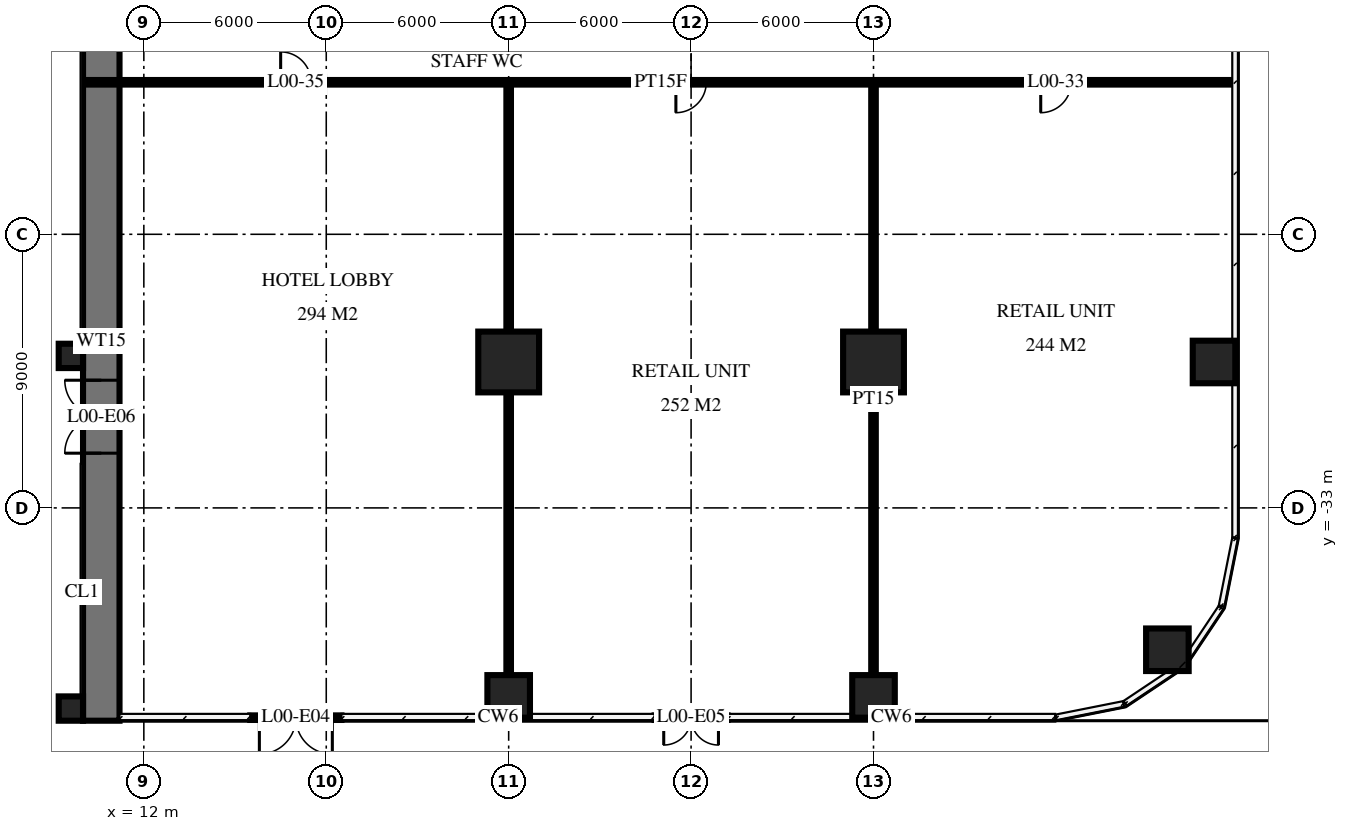
"""IFC4 building model, lengths in metres.
Left out: names, types, materials, properties, quantities, classifications, styles, units other than length and angle.
Written with IfcOpenShell. Run it as: python <this file> out.ifc"""

import sys

from ifc_helpers import new_model, si_unit, direction, frame, frame_2d, origin, origin_2d, place, context, subcontext, project, spatial, rectangle, circle, extrude, element, fill, save


model = new_model("IFC4")
c1 = context("Model", 3, precision=1e-05, world=origin(), true_north=direction((0.0, 1.0)))
c2 = subcontext(c1, "Body", "Model", "MODEL_VIEW")
j1 = project(units=[si_unit("LENGTHUNIT", "METRE"), si_unit("PLANEANGLEUNIT", "RADIAN")], contexts=[c1])
p1 = place(None, origin())
s1 = spatial("IfcSite", under=j1, at=p1, CompositionType="ELEMENT")
p2 = place(p1, origin())
s2 = spatial("IfcBuilding", under=s1, at=p2, CompositionType="ELEMENT")
p3 = place(p2, origin())
s3 = spatial("IfcBuildingStorey", under=s2, at=p3, CompositionType="ELEMENT", Elevation=0.0)
p4 = place(p3, frame((24.0, -39.2, -0.3), z_axis=(0.0, 0.0, 1.0), x_axis=(1.0, 0.0, 0.0)))
e1 = element("IfcColumn", 1, at=p4, inside=s3, PredefinedType="COLUMN", context=c2, shape_type="SweptSolid", body=[
    extrude(circle(Radius=0.7, at=origin_2d()), origin(), (0.0, 0.0, 1.0), 7.3),
])
p5 = place(p3, frame((24.0, -28.2, -0.3), z_axis=(0.0, 0.0, 1.0), x_axis=(1.0, 0.0, 0.0)))
e2 = element("IfcColumn", 2, at=p5, inside=s3, PredefinedType="COLUMN", context=c2, shape_type="SweptSolid", body=[
    extrude(circle(Radius=1.0, at=origin_2d()), origin(), (0.0, 0.0, 1.0), 7.3),
])
p6 = place(p3, frame((36.0, -39.2, -0.3), z_axis=(0.0, 0.0, 1.0), x_axis=(1.0, 0.0, 0.0)))
e3 = element("IfcColumn", 3, at=p6, inside=s3, PredefinedType="COLUMN", context=c2, shape_type="SweptSolid", body=[
    extrude(circle(Radius=0.7, at=origin_2d()), origin(), (0.0, 0.0, 1.0), 7.3),
])
p7 = place(p3, frame((36.0, -28.2, -0.3), z_axis=(0.0, 0.0, 1.0), x_axis=(1.0, 0.0, 0.0)))
e4 = element("IfcColumn", 4, at=p7, inside=s3, PredefinedType="COLUMN", context=c2, shape_type="SweptSolid", body=[
    extrude(circle(Radius=1.0, at=origin_2d()), origin(), (0.0, 0.0, 1.0), 7.3),
])
for number, where, z_axis, x_axis in (
    (5, (45.666, -37.666, -0.3), (0.0, 0.0, 1.0), (1.0, 0.0, 0.0)),
    (6, (47.2, -28.2, -0.3), (0.0, 0.0, 1.0), (1.0, 0.0, 0.0)),
):
    element("IfcColumn", number, at=place(p3, frame(where, z_axis=z_axis, x_axis=x_axis)), inside=s3, PredefinedType="COLUMN", context=c2, shape_type="SweptSolid", body=[
        extrude(circle(Radius=0.7, at=origin_2d()), origin(), (0.0, 0.0, 1.0), 7.3),
    ])
p8 = place(p3, frame((10.6, -40.0, -0.3), z_axis=(0.0, 0.0, 1.0), x_axis=(0.0, 1.0, 0.0)))
e7 = element("IfcWall", 7, at=p8, inside=s3, PredefinedType="SHEAR", context=c2, shape_type="SweptSolid", body=[
    extrude(rectangle(XDim=25.0, YDim=1.2, at=frame_2d((12.5, 0.0))), origin(), (0.0, 0.0, 1.0), 7.3),
])
p9 = place(p8, frame((8.8, 0.0, 0.3)))
e8 = element("IfcOpeningElement", 8, at=p9, cuts=e7, PredefinedType="OPENING", context=c2, shape_type="SweptSolid", body=[
    extrude(rectangle(XDim=2.4, YDim=2.7, at=frame_2d((1.2, 1.35))), frame((0.0, 0.61, 0.0), z_axis=(0.0, -1.0, 0.0), x_axis=(1.0, 0.0, 0.0)), (0.0, 0.0, 1.0), 1.22),
])
for number, where, z_axis, x_axis in (
    (9, (9.6, -39.6, -0.3), (0.0, 0.0, 1.0), (1.0, 0.0, 0.0)),
    (10, (9.6, -28.0, -0.3), (0.0, 0.0, 1.0), (1.0, 0.0, 0.0)),
):
    element("IfcColumn", number, at=place(p3, frame(where, z_axis=z_axis, x_axis=x_axis)), inside=s3, PredefinedType="COLUMN", context=c2, shape_type="SweptSolid", body=[
        extrude(rectangle(XDim=0.8, YDim=0.8, at=origin_2d()), origin(), (0.0, 0.0, 1.0), 7.3),
    ])
p10 = place(p3, frame((15.5, -39.9, 0.0), z_axis=(0.0, 0.0, 1.0), x_axis=(1.0, 0.0, 0.0)))
e11 = element("IfcWall", 11, at=p10, inside=s3, PredefinedType="USERDEFINED", context=c2, shape_type="SweptSolid", body=[
    extrude(rectangle(XDim=3.0, YDim=0.15, at=frame_2d((1.5, 0.0))), origin(), (0.0, 0.0, 1.0), 6.55),
])
p11 = place(p10, frame((0.3, 0.0, 0.0)))
e12 = element("IfcOpeningElement", 12, at=p11, cuts=e11, PredefinedType="OPENING", context=c2, shape_type="SweptSolid", body=[
    extrude(rectangle(XDim=2.4, YDim=2.7, at=frame_2d((1.2, 1.35))), frame((0.0, 0.085, 0.0), z_axis=(0.0, -1.0, 0.0), x_axis=(1.0, 0.0, 0.0)), (0.0, 0.0, 1.0), 0.17),
])
p12 = place(p3, frame((28.8, -39.9, 0.0), z_axis=(0.0, 0.0, 1.0), x_axis=(1.0, 0.0, 0.0)))
e13 = element("IfcWall", 13, at=p12, inside=s3, PredefinedType="USERDEFINED", context=c2, shape_type="SweptSolid", body=[
    extrude(rectangle(XDim=2.4, YDim=0.15, at=frame_2d((1.2, 0.0))), origin(), (0.0, 0.0, 1.0), 6.55),
])
p13 = place(p12, frame((0.3, 0.0, 0.0)))
e14 = element("IfcOpeningElement", 14, at=p13, cuts=e13, PredefinedType="OPENING", context=c2, shape_type="SweptSolid", body=[
    extrude(rectangle(XDim=1.8, YDim=2.4, at=frame_2d((0.9, 1.2))), frame((0.0, 0.085, 0.0), z_axis=(0.0, -1.0, 0.0), x_axis=(1.0, 0.0, 0.0)), (0.0, 0.0, 1.0), 0.17),
])
for number, where, z_axis, x_axis in (
    (15, (36.0, -39.82, 0.0), (0.0, 0.0, 1.0), (0.0, 1.0, 0.0)),
    (16, (24.0, -39.82, 0.0), (0.0, 0.0, 1.0), (0.0, 1.0, 0.0)),
):
    element("IfcWall", number, at=place(p3, frame(where, z_axis=z_axis, x_axis=x_axis)), inside=s3, PredefinedType="PARTITIONING", context=c2, shape_type="SweptSolid", body=[
        extrude(rectangle(XDim=20.82, YDim=0.15, at=frame_2d((10.41, 0.0))), origin(), (0.0, 0.0, 1.0), 6.55),
    ])
p14 = place(p3, frame((10.18, -19.0, 0.0), z_axis=(0.0, 0.0, 1.0), x_axis=(1.0, 0.0, 0.0)))
e17 = element("IfcWall", 17, at=p14, inside=s3, PredefinedType="PARTITIONING", context=c2, shape_type="SweptSolid", body=[
    extrude(rectangle(XDim=37.64, YDim=0.15, at=frame_2d((18.82, 0.0))), origin(), (0.0, 0.0, 1.0), 6.55),
])
p15 = place(p14, frame((31.32, 0.0, 0.0)))
e18 = element("IfcOpeningElement", 18, at=p15, cuts=e17, PredefinedType="OPENING", context=c2, shape_type="SweptSolid", body=[
    extrude(rectangle(XDim=1.0, YDim=2.1, at=frame_2d((0.5, 1.05))), frame((0.0, 0.085, 0.0), z_axis=(0.0, -1.0, 0.0), x_axis=(1.0, 0.0, 0.0)), (0.0, 0.0, 1.0), 0.17),
])
p16 = place(p14, frame((19.32, 0.0, 0.0)))
e19 = element("IfcOpeningElement", 19, at=p16, cuts=e17, PredefinedType="OPENING", context=c2, shape_type="SweptSolid", body=[
    extrude(rectangle(XDim=1.0, YDim=2.1, at=frame_2d((0.5, 1.05))), frame((0.0, 0.085, 0.0), z_axis=(0.0, -1.0, 0.0), x_axis=(1.0, 0.0, 0.0)), (0.0, 0.0, 1.0), 0.17),
])
p17 = place(p14, frame((6.32, 0.0, 0.0)))
e20 = element("IfcOpeningElement", 20, at=p17, cuts=e17, PredefinedType="OPENING", context=c2, shape_type="SweptSolid", body=[
    extrude(rectangle(XDim=1.0, YDim=2.1, at=frame_2d((0.5, 1.05))), frame((0.0, 0.085, 0.0), z_axis=(0.0, -1.0, 0.0), x_axis=(1.0, 0.0, 0.0)), (0.0, 0.0, 1.0), 0.17),
])
p18 = place(p11, frame((1.2, 0.0, 0.0), z_axis=(0.0, 0.0, 1.0), x_axis=(-1.0, 0.0, 0.0)))
e21 = element("IfcDoor", 21, at=p18, inside=s3, OperationType="DOUBLE_DOOR_DOUBLE_SWING", PredefinedType="DOOR", context=c2, shape_type="SweptSolid", body=[
    extrude(rectangle(XDim=2.4, YDim=2.7, at=frame_2d((0.0, 1.35))), frame((0.0, -0.025, 0.0), z_axis=(0.0, 1.0, 0.0), x_axis=(-1.0, 0.0, 0.0)), (0.0, 0.0, 1.0), 0.05),
])
fill(e12, e21)
p19 = place(p13, frame((0.9, 0.0, 0.0), z_axis=(0.0, 0.0, 1.0), x_axis=(-1.0, 0.0, 0.0)))
e22 = element("IfcDoor", 22, at=p19, inside=s3, OperationType="DOUBLE_DOOR_SINGLE_SWING", PredefinedType="DOOR", context=c2, shape_type="SweptSolid", body=[
    extrude(rectangle(XDim=1.8, YDim=2.4, at=frame_2d((0.0, 1.2))), frame((0.0, -0.025, 0.0), z_axis=(0.0, 1.0, 0.0), x_axis=(-1.0, 0.0, 0.0)), (0.0, 0.0, 1.0), 0.05),
])
fill(e14, e22)
p20 = place(p9, origin())
e23 = element("IfcDoor", 23, at=p20, inside=s3, OperationType="DOUBLE_DOOR_DOUBLE_SWING", PredefinedType="DOOR", context=c2, shape_type="SweptSolid", body=[
    extrude(rectangle(XDim=2.4, YDim=2.7, at=frame_2d((1.2, 1.35))), frame((0.0, 0.025, 0.0), z_axis=(0.0, -1.0, 0.0), x_axis=(1.0, 0.0, 0.0)), (0.0, 0.0, 1.0), 0.05),
])
fill(e8, e23)
p21 = place(p15, frame((0.5, 0.0, 0.0), z_axis=(0.0, 0.0, 1.0), x_axis=(-1.0, 0.0, 0.0)))
e24 = element("IfcDoor", 24, at=p21, inside=s3, OperationType="SINGLE_SWING_LEFT", PredefinedType="DOOR", context=c2, shape_type="SweptSolid", body=[
    extrude(rectangle(XDim=1.0, YDim=2.1, at=frame_2d((0.0, 1.05))), frame((0.0, -0.025, 0.0), z_axis=(0.0, 1.0, 0.0), x_axis=(-1.0, 0.0, 0.0)), (0.0, 0.0, 1.0), 0.05),
])
fill(e18, e24)
p22 = place(p16, frame((0.5, 0.0, 0.0), z_axis=(0.0, 0.0, 1.0), x_axis=(-1.0, 0.0, 0.0)))
e25 = element("IfcDoor", 25, at=p22, inside=s3, OperationType="SINGLE_SWING_LEFT", PredefinedType="DOOR", context=c2, shape_type="SweptSolid", body=[
    extrude(rectangle(XDim=1.0, YDim=2.1, at=frame_2d((0.0, 1.05))), frame((0.0, -0.025, 0.0), z_axis=(0.0, 1.0, 0.0), x_axis=(-1.0, 0.0, 0.0)), (0.0, 0.0, 1.0), 0.05),
])
fill(e19, e25)
p23 = place(p17, origin())
e26 = element("IfcDoor", 26, at=p23, inside=s3, OperationType="SINGLE_SWING_RIGHT", PredefinedType="DOOR", context=c2, shape_type="SweptSolid", body=[
    extrude(rectangle(XDim=1.0, YDim=2.1, at=frame_2d((0.5, 1.05))), frame((0.0, 0.025, 0.0), z_axis=(0.0, -1.0, 0.0), x_axis=(1.0, 0.0, 0.0)), (0.0, 0.0, 1.0), 0.05),
])
fill(e20, e26)
save(model, sys.argv[1])
